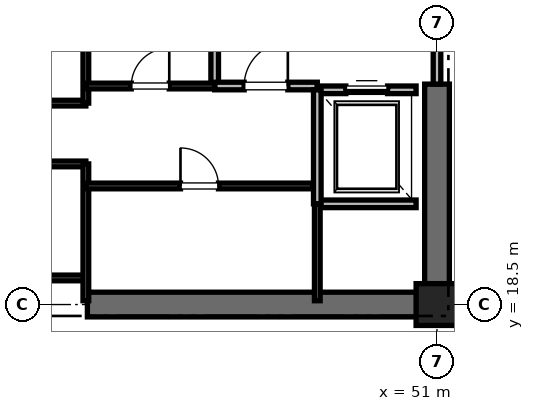
"""IFC4 building model, lengths in metres.
Left out: names, types, materials, properties, quantities, classifications, styles, units other than length and angle.
Written with IfcOpenShell. Run it as: python <this file> out.ifc"""

import sys

from ifc_helpers import new_model, si_unit, direction, frame, frame_2d, origin, origin_2d, place, context, subcontext, project, spatial, rectangle, extrude, element, fill, save


model = new_model("IFC4")
c1 = context("Model", 3, precision=1e-05, world=origin(), true_north=direction((0.0, 1.0)))
c2 = subcontext(c1, "Body", "Model", "MODEL_VIEW")
j1 = project(units=[si_unit("LENGTHUNIT", "METRE"), si_unit("PLANEANGLEUNIT", "RADIAN")], contexts=[c1])
p1 = place(None, origin())
s1 = spatial("IfcSite", under=j1, at=p1, CompositionType="ELEMENT")
p2 = place(p1, origin())
s2 = spatial("IfcBuilding", under=s1, at=p2, CompositionType="ELEMENT")
p3 = place(p2, origin())
s3 = spatial("IfcBuildingStorey", under=s2, at=p3, CompositionType="ELEMENT", Elevation=0.0)
p4 = place(p3, frame((51.0, 18.5, 0.0), z_axis=(0.0, 0.0, 1.0), x_axis=(1.0, 0.0, 0.0)))
e1 = element("IfcColumn", 1, at=p4, inside=s3, PredefinedType="PILASTER", context=c2, shape_type="SweptSolid", body=[
    extrude(rectangle(XDim=1.1, YDim=1.1, at=origin_2d()), origin(), (0.0, 0.0, 1.0), 6.0),
])
p5 = place(p3, frame((41.8, 18.5, 0.0), z_axis=(0.0, 0.0, 1.0), x_axis=(1.0, 0.0, 0.0)))
e2 = element("IfcWall", 2, at=p5, inside=s3, PredefinedType="SHEAR", context=c2, shape_type="SweptSolid", body=[
    extrude(rectangle(XDim=9.2, YDim=0.65, at=frame_2d((4.6, 0.0))), origin(), (0.0, 0.0, 1.0), 5.72),
])
p6 = place(p3, frame((51.0, 18.5, 0.0), z_axis=(0.0, 0.0, 1.0), x_axis=(0.0, 1.0, 0.0)))
e3 = element("IfcWall", 3, at=p6, inside=s3, PredefinedType="SHEAR", context=c2, shape_type="SweptSolid", body=[
    extrude(rectangle(XDim=5.8, YDim=0.65, at=frame_2d((2.9, 0.0))), origin(), (0.0, 0.0, 1.0), 5.72),
])
p7 = place(p3, frame((45.15, 24.25, 0.0), z_axis=(0.0, 0.0, 1.0), x_axis=(0.0, 1.0, 0.0)))
e4 = element("IfcWall", 4, at=p7, inside=s3, PredefinedType="PARTITIONING", context=c2, shape_type="SweptSolid", body=[
    extrude(rectangle(XDim=3.37, YDim=0.2, at=frame_2d((1.685, 0.0))), origin(), (0.0, 0.0, 1.0), 5.72),
])
p8 = place(p3, frame((45.15, 24.25, 0.0), z_axis=(0.0, 0.0, 1.0), x_axis=(1.0, 0.0, 0.0)))
e5 = element("IfcWall", 5, at=p8, inside=s3, PredefinedType="PARTITIONING", context=c2, shape_type="SweptSolid", body=[
    extrude(rectangle(XDim=2.7, YDim=0.2, at=frame_2d((1.35, 0.0))), origin(), (0.0, 0.0, 1.0), 5.72),
])
p9 = place(p8, frame((0.775, 0.0, 0.0)))
e6 = element("IfcOpeningElement", 6, at=p9, cuts=e5, PredefinedType="OPENING", context=c2, shape_type="SweptSolid", body=[
    extrude(rectangle(XDim=1.15, YDim=2.2, at=frame_2d((0.575, 1.1))), frame((0.0, 0.1, 0.0), z_axis=(0.0, -1.0, 0.0), x_axis=(1.0, 0.0, 0.0)), (0.0, 0.0, 1.0), 0.2),
])
p10 = place(p3, frame((51.0, 27.7, 0.0), z_axis=(0.0, 0.0, 1.0), x_axis=(0.0, -1.0, 0.0)))
e7 = element("IfcWall", 7, at=p10, inside=s3, PredefinedType="PARTITIONING", context=c2, shape_type="SweptSolid", body=[
    extrude(rectangle(XDim=3.4, YDim=0.2, at=frame_2d((1.7, 0.0))), origin(), (0.0, 0.0, 1.0), 4.5),
])
p11 = place(p10, frame((1.125, 0.0, 0.0)))
e8 = element("IfcOpeningElement", 8, at=p11, cuts=e7, PredefinedType="OPENING", context=c2, shape_type="SweptSolid", body=[
    extrude(rectangle(XDim=1.15, YDim=2.2, at=frame_2d((0.575, 1.1))), frame((0.0, 0.1, 0.0), z_axis=(0.0, -1.0, 0.0), x_axis=(1.0, 0.0, 0.0)), (0.0, 0.0, 1.0), 0.2),
])
p12 = place(p3, frame((47.85, 21.15, 0.0), z_axis=(0.0, 0.0, 1.0), x_axis=(1.0, 0.0, 0.0)))
e9 = element("IfcWall", 9, at=p12, inside=s3, PredefinedType="SOLIDWALL", context=c2, shape_type="SweptSolid", body=[
    extrude(rectangle(XDim=2.6, YDim=0.2, at=frame_2d((1.3, 0.0))), origin(), (0.0, 0.0, 1.0), 5.72),
])
p13 = place(p3, frame((50.45, 24.15, 0.0), z_axis=(0.0, 0.0, 1.0), x_axis=(-1.0, 0.0, 0.0)))
e10 = element("IfcWall", 10, at=p13, inside=s3, PredefinedType="SOLIDWALL", context=c2, shape_type="SweptSolid", body=[
    extrude(rectangle(XDim=2.6, YDim=0.2, at=frame_2d((1.3, 0.0))), origin(), (0.0, 0.0, 1.0), 4.5),
])
p14 = place(p13, frame((0.75, 0.0, 0.0)))
e11 = element("IfcOpeningElement", 11, at=p14, cuts=e10, PredefinedType="OPENING", context=c2, shape_type="SweptSolid", body=[
    extrude(rectangle(XDim=1.1, YDim=2.2, at=frame_2d((0.55, 1.1))), frame((0.0, 0.1, 0.0), z_axis=(0.0, -1.0, 0.0), x_axis=(1.0, 0.0, 0.0)), (0.0, 0.0, 1.0), 0.2),
])
p15 = place(p3, frame((47.85, 24.15, 0.0), z_axis=(0.0, 0.0, 1.0), x_axis=(0.0, -1.0, 0.0)))
e12 = element("IfcWall", 12, at=p15, inside=s3, PredefinedType="SOLIDWALL", context=c2, shape_type="SweptSolid", body=[
    extrude(rectangle(XDim=3.0, YDim=0.2, at=frame_2d((1.5, 0.0))), origin(), (0.0, 0.0, 1.0), 5.72),
])
for number, where, z_axis, x_axis in (
    (13, (39.95, 19.2, 0.0), (0.0, 0.0, 1.0), (1.0, 0.0, 0.0)),
    (14, (39.95, 22.2, 0.0), (0.0, 0.0, 1.0), (1.0, 0.0, 0.0)),
    (15, (39.95, 23.8, 0.0), (0.0, 0.0, 1.0), (1.0, 0.0, 0.0)),
):
    element("IfcWall", number, at=place(p3, frame(where, z_axis=z_axis, x_axis=x_axis)), inside=s3, PredefinedType="PARTITIONING", context=c2, shape_type="SweptSolid", body=[
        extrude(rectangle(XDim=1.81, YDim=0.15, at=frame_2d((0.905, 0.0))), origin(), (0.0, 0.0, 1.0), 2.85),
    ])
p16 = place(p3, frame((41.76, 18.6, 0.0), z_axis=(0.0, 0.0, 1.0), x_axis=(0.0, 1.0, 0.0)))
e16 = element("IfcWall", 16, at=p16, inside=s3, PredefinedType="PARTITIONING", context=c2, shape_type="SweptSolid", body=[
    extrude(rectangle(XDim=3.6, YDim=0.15, at=frame_2d((1.8, 0.0))), origin(), (0.0, 0.0, 1.0), 2.85),
])
p17 = place(p3, frame((41.76, 23.8, 0.0), z_axis=(0.0, 0.0, 1.0), x_axis=(0.0, 1.0, 0.0)))
e17 = element("IfcWall", 17, at=p17, inside=s3, PredefinedType="PARTITIONING", context=c2, shape_type="SweptSolid", body=[
    extrude(rectangle(XDim=4.0, YDim=0.15, at=frame_2d((2.0, 0.0))), origin(), (0.0, 0.0, 1.0), 2.85),
])
p18 = place(p3, frame((47.85, 18.6, 0.0), z_axis=(0.0, 0.0, 1.0), x_axis=(0.0, 1.0, 0.0)))
e18 = element("IfcWall", 18, at=p18, inside=s3, PredefinedType="PARTITIONING", context=c2, shape_type="SweptSolid", body=[
    extrude(rectangle(XDim=2.54, YDim=0.15, at=frame_2d((1.27, 0.0))), origin(), (0.0, 0.0, 1.0), 2.85),
])
p19 = place(p3, frame((41.76, 21.62, 0.0), z_axis=(0.0, 0.0, 1.0), x_axis=(1.0, 0.0, 0.0)))
e19 = element("IfcWall", 19, at=p19, inside=s3, PredefinedType="PARTITIONING", context=c2, shape_type="SweptSolid", body=[
    extrude(rectangle(XDim=5.98, YDim=0.15, at=frame_2d((2.99, 0.0))), origin(), (0.0, 0.0, 1.0), 2.85),
])
p20 = place(p19, frame((2.49, 0.0, 0.0)))
e20 = element("IfcOpeningElement", 20, at=p20, cuts=e19, PredefinedType="OPENING", context=c2, shape_type="SweptSolid", body=[
    extrude(rectangle(XDim=1.0, YDim=2.15, at=frame_2d((0.5, 1.075))), frame((0.0, 0.075, 0.0), z_axis=(0.0, -1.0, 0.0), x_axis=(1.0, 0.0, 0.0)), (0.0, 0.0, 1.0), 0.15),
])
p21 = place(p3, frame((41.76, 24.25, 0.0), z_axis=(0.0, 0.0, 1.0), x_axis=(1.0, 0.0, 0.0)))
e21 = element("IfcWall", 21, at=p21, inside=s3, PredefinedType="PARTITIONING", context=c2, shape_type="SweptSolid", body=[
    extrude(rectangle(XDim=3.39, YDim=0.15, at=frame_2d((1.695, 0.0))), origin(), (0.0, 0.0, 1.0), 2.85),
])
p22 = place(p21, frame((1.195, 0.0, 0.0)))
e22 = element("IfcOpeningElement", 22, at=p22, cuts=e21, PredefinedType="OPENING", context=c2, shape_type="SweptSolid", body=[
    extrude(rectangle(XDim=1.0, YDim=2.15, at=frame_2d((0.5, 1.075))), frame((0.0, 0.075, 0.0), z_axis=(0.0, -1.0, 0.0), x_axis=(1.0, 0.0, 0.0)), (0.0, 0.0, 1.0), 0.15),
])
p23 = place(p9, origin())
e23 = element("IfcDoor", 23, at=p23, inside=s3, OperationType="SINGLE_SWING_RIGHT", PredefinedType="DOOR", context=c2, shape_type="SweptSolid", body=[
    extrude(rectangle(XDim=1.15, YDim=2.2, at=frame_2d((0.575, 1.1))), frame((0.0, 0.025, 0.0), z_axis=(0.0, -1.0, 0.0), x_axis=(1.0, 0.0, 0.0)), (0.0, 0.0, 1.0), 0.05),
])
fill(e6, e23)
p24 = place(p14, origin())
e24 = element("IfcDoor", 24, at=p24, inside=s3, OperationType="SLIDING_TO_RIGHT", PredefinedType="DOOR", context=c2, shape_type="SweptSolid", body=[
    extrude(rectangle(XDim=1.1, YDim=2.2, at=frame_2d((0.55, 1.1))), frame((0.0, 0.025, 0.0), z_axis=(0.0, -1.0, 0.0), x_axis=(1.0, 0.0, 0.0)), (0.0, 0.0, 1.0), 0.05),
])
fill(e11, e24)
p25 = place(p20, origin())
e25 = element("IfcDoor", 25, at=p25, inside=s3, OperationType="SINGLE_SWING_LEFT", PredefinedType="DOOR", context=c2, shape_type="SweptSolid", body=[
    extrude(rectangle(XDim=1.0, YDim=2.15, at=frame_2d((0.5, 1.075))), frame((0.0, 0.025, 0.0), z_axis=(0.0, -1.0, 0.0), x_axis=(1.0, 0.0, 0.0)), (0.0, 0.0, 1.0), 0.05),
])
fill(e20, e25)
p26 = place(p22, origin())
e26 = element("IfcDoor", 26, at=p26, inside=s3, OperationType="SINGLE_SWING_RIGHT", PredefinedType="DOOR", context=c2, shape_type="SweptSolid", body=[
    extrude(rectangle(XDim=1.0, YDim=2.15, at=frame_2d((0.5, 1.075))), frame((0.0, 0.025, 0.0), z_axis=(0.0, -1.0, 0.0), x_axis=(1.0, 0.0, 0.0)), (0.0, 0.0, 1.0), 0.05),
])
fill(e22, e26)
save(model, sys.argv[1])
